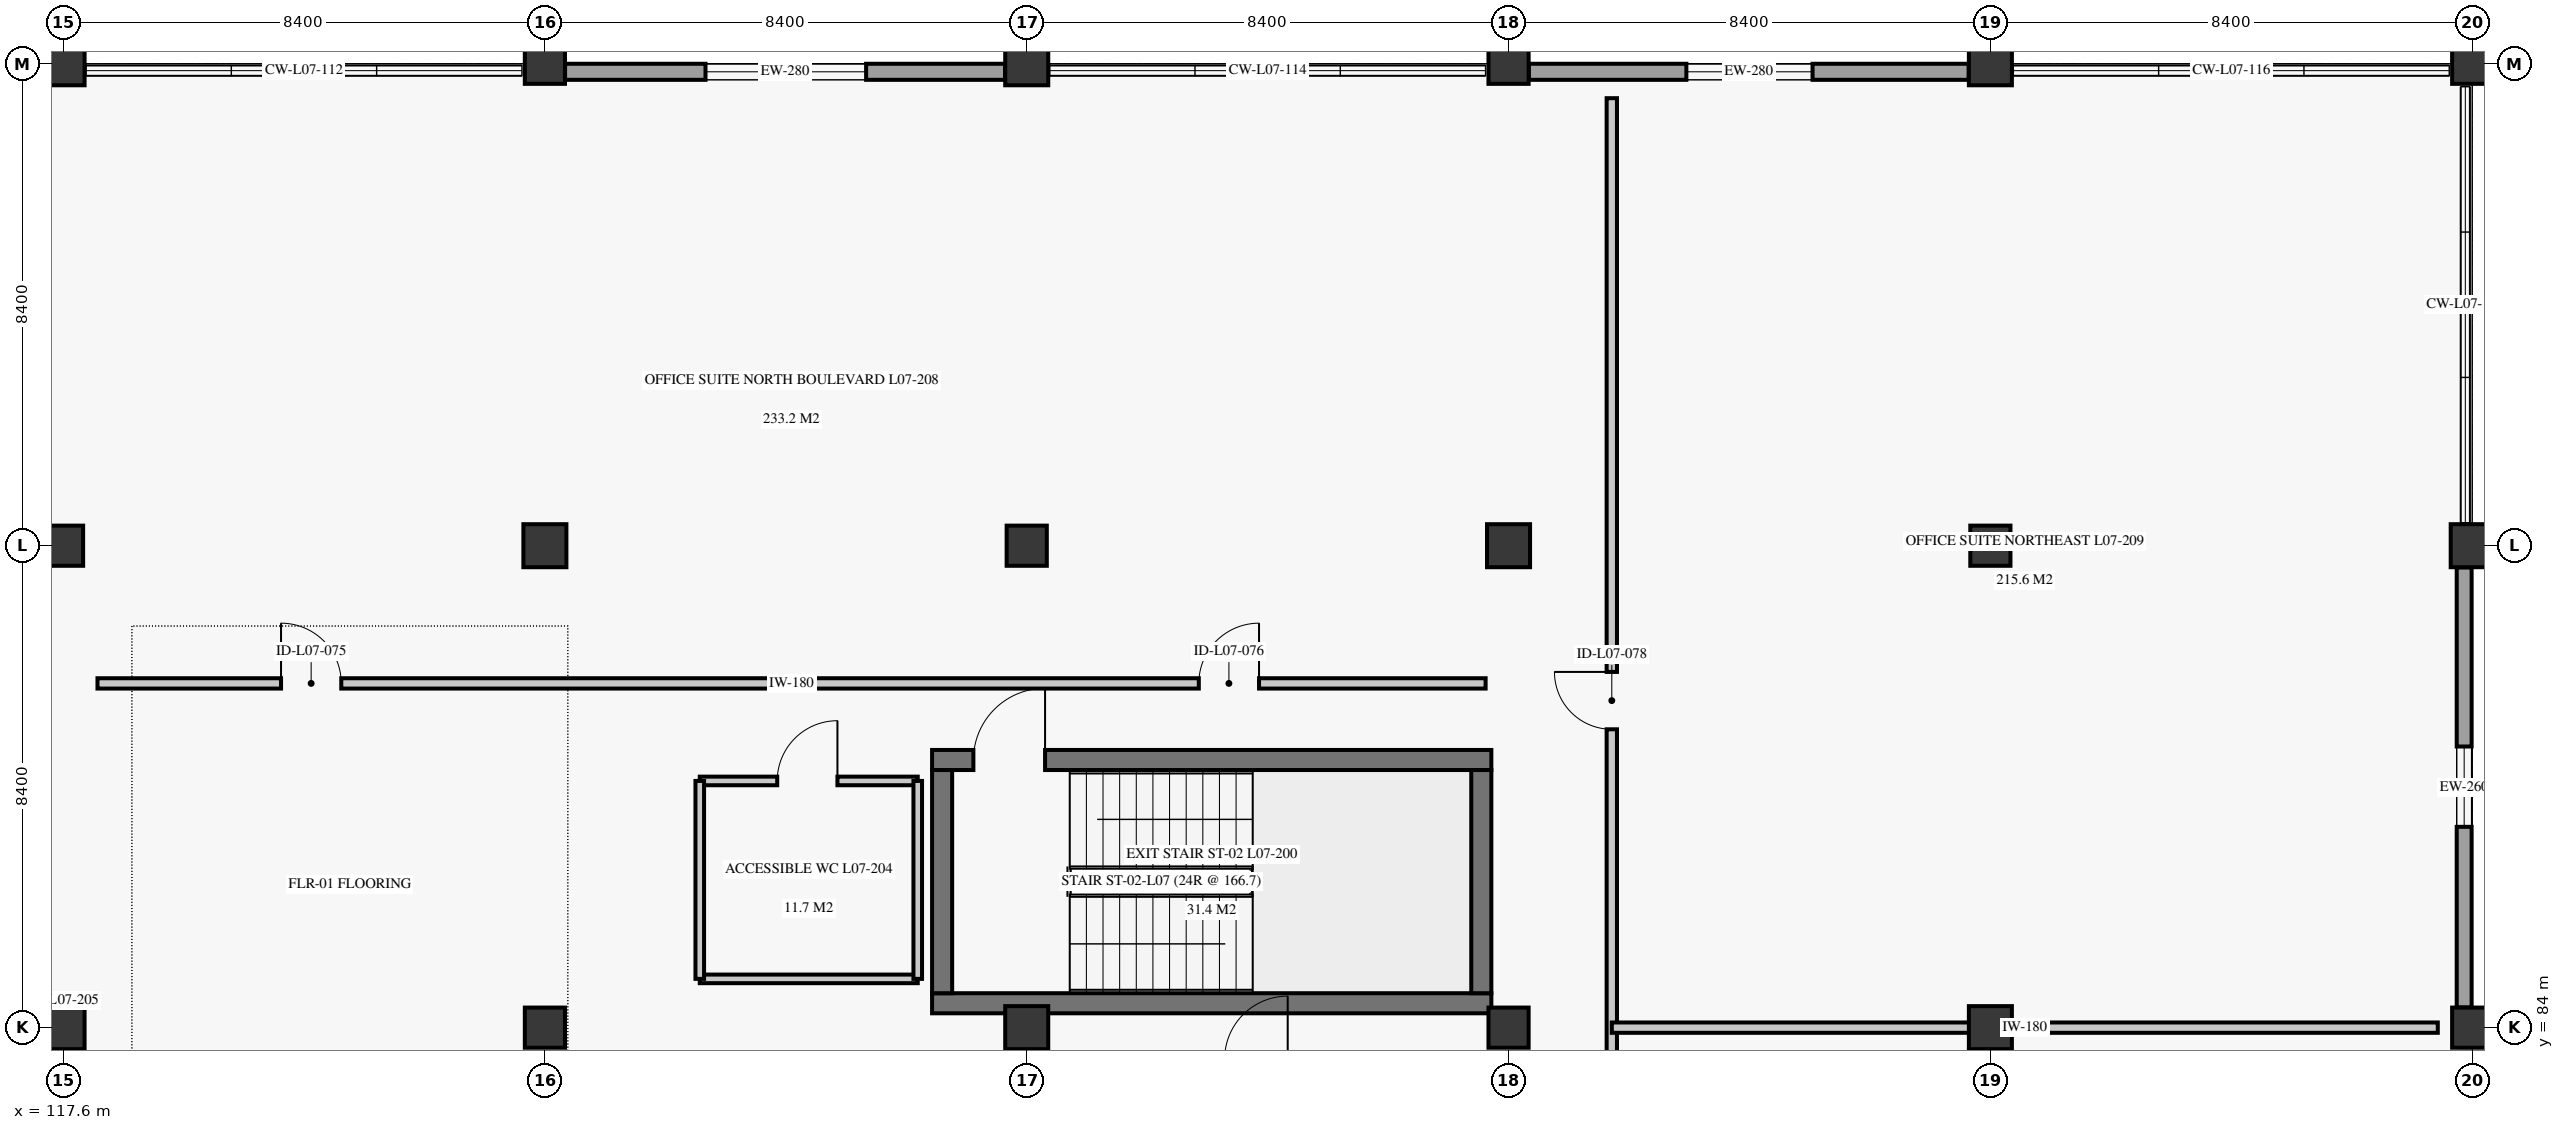
"""IFC4 building model, lengths in metres.
Left out: names, types, materials, properties, quantities, classifications, styles, units other than length and angle.
Written with IfcOpenShell. Run it as: python <this file> out.ifc"""

import sys

from ifc_helpers import new_model, si_unit, direction, frame, frame_2d, origin, origin_2d, place, context, subcontext, project, spatial, rectangle, extrude, element, fill, save


model = new_model("IFC4")
c1 = context("Model", 3, precision=1e-05, world=origin(), true_north=direction((0.0, 1.0)))
c2 = subcontext(c1, "Body", "Model", "MODEL_VIEW")
j1 = project(units=[si_unit("LENGTHUNIT", "METRE"), si_unit("PLANEANGLEUNIT", "RADIAN")], contexts=[c1])
p1 = place(None, origin())
s1 = spatial("IfcSite", under=j1, at=p1, CompositionType="ELEMENT")
p2 = place(p1, origin())
s2 = spatial("IfcBuilding", under=s1, at=p2, CompositionType="ELEMENT")
p3 = place(p2, frame((0.0, 0.0, 30.7)))
s3 = spatial("IfcBuildingStorey", under=s2, at=p3, CompositionType="ELEMENT", Elevation=30.7)
p4 = place(p3, frame((117.6, 84.0, 0.0), z_axis=(0.0, 0.0, 1.0), x_axis=(1.0, 0.0, 0.0)))
e1 = element("IfcColumn", 1, at=p4, inside=s3, PredefinedType="COLUMN", context=c2, shape_type="SweptSolid", body=[
    extrude(rectangle(XDim=0.75, YDim=0.75, at=origin_2d()), origin(), (0.0, 0.0, 1.0), 3.72),
])
p5 = place(p3, frame((117.6, 92.4, 0.0), z_axis=(0.0, 0.0, 1.0), x_axis=(1.0, 0.0, 0.0)))
e2 = element("IfcColumn", 2, at=p5, inside=s3, PredefinedType="COLUMN", context=c2, shape_type="SweptSolid", body=[
    extrude(rectangle(XDim=0.7, YDim=0.7, at=origin_2d()), origin(), (0.0, 0.0, 1.0), 3.72),
])
p6 = place(p3, frame((117.6, 100.8, 0.0), z_axis=(0.0, 0.0, 1.0), x_axis=(1.0, 0.0, 0.0)))
e3 = element("IfcColumn", 3, at=p6, inside=s3, PredefinedType="COLUMN", context=c2, shape_type="SweptSolid", body=[
    extrude(rectangle(XDim=0.75, YDim=0.75, at=origin_2d()), origin(), (0.0, 0.0, 1.0), 3.72),
])
p7 = place(p3, frame((126.0, 84.0, 0.0), z_axis=(0.0, 0.0, 1.0), x_axis=(1.0, 0.0, 0.0)))
e4 = element("IfcColumn", 4, at=p7, inside=s3, PredefinedType="COLUMN", context=c2, shape_type="SweptSolid", body=[
    extrude(rectangle(XDim=0.7, YDim=0.7, at=origin_2d()), origin(), (0.0, 0.0, 1.0), 3.72),
])
p8 = place(p3, frame((126.0, 92.4, 0.0), z_axis=(0.0, 0.0, 1.0), x_axis=(1.0, 0.0, 0.0)))
e5 = element("IfcColumn", 5, at=p8, inside=s3, PredefinedType="COLUMN", context=c2, shape_type="SweptSolid", body=[
    extrude(rectangle(XDim=0.75, YDim=0.75, at=origin_2d()), origin(), (0.0, 0.0, 1.0), 3.72),
])
p9 = place(p3, frame((126.0, 100.8, 0.0), z_axis=(0.0, 0.0, 1.0), x_axis=(1.0, 0.0, 0.0)))
e6 = element("IfcColumn", 6, at=p9, inside=s3, PredefinedType="COLUMN", context=c2, shape_type="SweptSolid", body=[
    extrude(rectangle(XDim=0.7, YDim=0.7, at=origin_2d()), origin(), (0.0, 0.0, 1.0), 3.72),
])
p10 = place(p3, frame((134.4, 84.0, 0.0), z_axis=(0.0, 0.0, 1.0), x_axis=(1.0, 0.0, 0.0)))
e7 = element("IfcColumn", 7, at=p10, inside=s3, PredefinedType="COLUMN", context=c2, shape_type="SweptSolid", body=[
    extrude(rectangle(XDim=0.75, YDim=0.75, at=origin_2d()), origin(), (0.0, 0.0, 1.0), 3.72),
])
p11 = place(p3, frame((134.4, 92.4, 0.0), z_axis=(0.0, 0.0, 1.0), x_axis=(1.0, 0.0, 0.0)))
e8 = element("IfcColumn", 8, at=p11, inside=s3, PredefinedType="COLUMN", context=c2, shape_type="SweptSolid", body=[
    extrude(rectangle(XDim=0.7, YDim=0.7, at=origin_2d()), origin(), (0.0, 0.0, 1.0), 3.72),
])
p12 = place(p3, frame((134.4, 100.8, 0.0), z_axis=(0.0, 0.0, 1.0), x_axis=(1.0, 0.0, 0.0)))
e9 = element("IfcColumn", 9, at=p12, inside=s3, PredefinedType="COLUMN", context=c2, shape_type="SweptSolid", body=[
    extrude(rectangle(XDim=0.75, YDim=0.75, at=origin_2d()), origin(), (0.0, 0.0, 1.0), 3.72),
])
p13 = place(p3, frame((142.8, 84.0, 0.0), z_axis=(0.0, 0.0, 1.0), x_axis=(1.0, 0.0, 0.0)))
e10 = element("IfcColumn", 10, at=p13, inside=s3, PredefinedType="COLUMN", context=c2, shape_type="SweptSolid", body=[
    extrude(rectangle(XDim=0.7, YDim=0.7, at=origin_2d()), origin(), (0.0, 0.0, 1.0), 3.72),
])
p14 = place(p3, frame((142.8, 92.4, 0.0), z_axis=(0.0, 0.0, 1.0), x_axis=(1.0, 0.0, 0.0)))
e11 = element("IfcColumn", 11, at=p14, inside=s3, PredefinedType="COLUMN", context=c2, shape_type="SweptSolid", body=[
    extrude(rectangle(XDim=0.75, YDim=0.75, at=origin_2d()), origin(), (0.0, 0.0, 1.0), 3.72),
])
p15 = place(p3, frame((142.8, 100.8, 0.0), z_axis=(0.0, 0.0, 1.0), x_axis=(1.0, 0.0, 0.0)))
e12 = element("IfcColumn", 12, at=p15, inside=s3, PredefinedType="COLUMN", context=c2, shape_type="SweptSolid", body=[
    extrude(rectangle(XDim=0.7, YDim=0.7, at=origin_2d()), origin(), (0.0, 0.0, 1.0), 3.72),
])
p16 = place(p3, frame((151.2, 84.0, 0.0), z_axis=(0.0, 0.0, 1.0), x_axis=(1.0, 0.0, 0.0)))
e13 = element("IfcColumn", 13, at=p16, inside=s3, PredefinedType="COLUMN", context=c2, shape_type="SweptSolid", body=[
    extrude(rectangle(XDim=0.75, YDim=0.75, at=origin_2d()), origin(), (0.0, 0.0, 1.0), 3.72),
])
p17 = place(p3, frame((151.2, 92.4, 0.0), z_axis=(0.0, 0.0, 1.0), x_axis=(1.0, 0.0, 0.0)))
e14 = element("IfcColumn", 14, at=p17, inside=s3, PredefinedType="COLUMN", context=c2, shape_type="SweptSolid", body=[
    extrude(rectangle(XDim=0.7, YDim=0.7, at=origin_2d()), origin(), (0.0, 0.0, 1.0), 3.72),
])
p18 = place(p3, frame((151.2, 100.8, 0.0), z_axis=(0.0, 0.0, 1.0), x_axis=(1.0, 0.0, 0.0)))
e15 = element("IfcColumn", 15, at=p18, inside=s3, PredefinedType="COLUMN", context=c2, shape_type="SweptSolid", body=[
    extrude(rectangle(XDim=0.75, YDim=0.75, at=origin_2d()), origin(), (0.0, 0.0, 1.0), 3.72),
])
p19 = place(p3, frame((159.6, 84.0, 0.0), z_axis=(0.0, 0.0, 1.0), x_axis=(1.0, 0.0, 0.0)))
e16 = element("IfcColumn", 16, at=p19, inside=s3, PredefinedType="COLUMN", context=c2, shape_type="SweptSolid", body=[
    extrude(rectangle(XDim=0.7, YDim=0.7, at=origin_2d()), origin(), (0.0, 0.0, 1.0), 3.72),
])
p20 = place(p3, frame((159.6, 92.4, 0.0), z_axis=(0.0, 0.0, 1.0), x_axis=(1.0, 0.0, 0.0)))
e17 = element("IfcColumn", 17, at=p20, inside=s3, PredefinedType="COLUMN", context=c2, shape_type="SweptSolid", body=[
    extrude(rectangle(XDim=0.75, YDim=0.75, at=origin_2d()), origin(), (0.0, 0.0, 1.0), 3.72),
])
p21 = place(p3, frame((159.6, 100.8, 0.0), z_axis=(0.0, 0.0, 1.0), x_axis=(1.0, 0.0, 0.0)))
e18 = element("IfcColumn", 18, at=p21, inside=s3, PredefinedType="COLUMN", context=c2, shape_type="SweptSolid", body=[
    extrude(rectangle(XDim=0.7, YDim=0.7, at=origin_2d()), origin(), (0.0, 0.0, 1.0), 3.72),
])
p22 = place(p3, frame((126.352, 100.66, 0.0), z_axis=(0.0, 0.0, 1.0), x_axis=(1.0, 0.0, 0.0)))
e19 = element("IfcWall", 19, at=p22, inside=s3, PredefinedType="SOLIDWALL", context=c2, shape_type="SweptSolid", body=[
    extrude(rectangle(XDim=7.67, YDim=0.28, at=frame_2d((3.835, 0.0))), origin(), (0.0, 0.0, 1.0), 3.04),
])
p23 = place(p22, frame((2.448, 0.0, 0.85)))
e20 = element("IfcOpeningElement", 20, at=p23, cuts=e19, PredefinedType="OPENING", context=c2, shape_type="SweptSolid", body=[
    extrude(rectangle(XDim=2.8, YDim=1.85, at=frame_2d((1.4, 0.925))), frame((0.0, 0.15, 0.0), z_axis=(0.0, -1.0, 0.0), x_axis=(1.0, 0.0, 0.0)), (0.0, 0.0, 1.0), 0.3),
])
p24 = place(p3, frame((143.154, 100.66, 0.0), z_axis=(0.0, 0.0, 1.0), x_axis=(1.0, 0.0, 0.0)))
e21 = element("IfcWall", 21, at=p24, inside=s3, PredefinedType="SOLIDWALL", context=c2, shape_type="SweptSolid", body=[
    extrude(rectangle(XDim=7.668, YDim=0.28, at=frame_2d((3.834, 0.0))), origin(), (0.0, 0.0, 1.0), 3.04),
])
p25 = place(p24, frame((2.746, 0.0, 0.85)))
e22 = element("IfcOpeningElement", 22, at=p25, cuts=e21, PredefinedType="OPENING", context=c2, shape_type="SweptSolid", body=[
    extrude(rectangle(XDim=2.2, YDim=1.8, at=frame_2d((1.1, 0.9))), frame((0.0, 0.15, 0.0), z_axis=(0.0, -1.0, 0.0), x_axis=(1.0, 0.0, 0.0)), (0.0, 0.0, 1.0), 0.3),
])
p26 = place(p3, frame((159.46, 84.352, 0.0), z_axis=(0.0, 0.0, 1.0), x_axis=(0.0, 1.0, 0.0)))
e23 = element("IfcWall", 23, at=p26, inside=s3, PredefinedType="SOLIDWALL", context=c2, shape_type="SweptSolid", body=[
    extrude(rectangle(XDim=7.67, YDim=0.26, at=frame_2d((3.835, 0.0))), origin(), (0.0, 0.0, 1.0), 3.04),
])
p27 = place(p26, frame((3.148, 0.0, 0.85)))
e24 = element("IfcOpeningElement", 24, at=p27, cuts=e23, PredefinedType="OPENING", context=c2, shape_type="SweptSolid", body=[
    extrude(rectangle(XDim=1.4, YDim=1.7, at=frame_2d((0.7, 0.85))), frame((0.0, 0.14, 0.0), z_axis=(0.0, -1.0, 0.0), x_axis=(1.0, 0.0, 0.0)), (0.0, 0.0, 1.0), 0.28),
])
p28 = place(p3, frame((132.75, 84.425, 0.0), z_axis=(0.0, 0.0, 1.0), x_axis=(1.0, 0.0, 0.0)))
e25 = element("IfcWall", 25, at=p28, inside=s3, PredefinedType="SHEAR", context=c2, shape_type="SweptSolid", body=[
    extrude(rectangle(XDim=9.75, YDim=0.35, at=frame_2d((4.875, 0.0))), origin(), (0.0, 0.0, 1.0), 3.72),
])
p29 = place(p3, frame((132.75, 88.665, 0.0), z_axis=(0.0, 0.0, 1.0), x_axis=(1.0, 0.0, 0.0)))
e26 = element("IfcWall", 26, at=p29, inside=s3, PredefinedType="SHEAR", context=c2, shape_type="SweptSolid", body=[
    extrude(rectangle(XDim=9.75, YDim=0.35, at=frame_2d((4.875, 0.0))), origin(), (0.0, 0.0, 1.0), 3.72),
])
p30 = place(p29, frame((0.72, 0.0, 0.0)))
e27 = element("IfcOpeningElement", 27, at=p30, cuts=e26, PredefinedType="OPENING", context=c2, shape_type="SweptSolid", body=[
    extrude(rectangle(XDim=1.25, YDim=2.2, at=frame_2d((0.625, 1.1))), frame((0.0, 0.185, 0.0), z_axis=(0.0, -1.0, 0.0), x_axis=(1.0, 0.0, 0.0)), (0.0, 0.0, 1.0), 0.37),
])
for number, where, z_axis, x_axis in (
    (28, (132.925, 84.6, 0.0), (0.0, 0.0, 1.0), (0.0, 1.0, 0.0)),
    (29, (142.325, 84.6, 0.0), (0.0, 0.0, 1.0), (0.0, 1.0, 0.0)),
):
    element("IfcWall", number, at=place(p3, frame(where, z_axis=z_axis, x_axis=x_axis)), inside=s3, PredefinedType="SHEAR", context=c2, shape_type="SweptSolid", body=[
        extrude(rectangle(XDim=3.89, YDim=0.35, at=frame_2d((1.945, 0.0))), origin(), (0.0, 0.0, 1.0), 3.72),
    ])
p31 = place(p3, frame((128.7, 88.3, 0.0), z_axis=(0.0, 0.0, 1.0), x_axis=(1.0, 0.0, 0.0)))
e30 = element("IfcWall", 30, at=p31, inside=s3, PredefinedType="PARTITIONING", context=c2, shape_type="SweptSolid", body=[
    extrude(rectangle(XDim=3.8, YDim=0.15, at=frame_2d((1.9, 0.0))), origin(), (0.0, 0.0, 1.0), 3.34),
])
p32 = place(p31, frame((1.35, 0.0, 0.0)))
e31 = element("IfcOpeningElement", 31, at=p32, cuts=e30, PredefinedType="OPENING", context=c2, shape_type="SweptSolid", body=[
    extrude(rectangle(XDim=1.05, YDim=2.15, at=frame_2d((0.525, 1.075))), frame((0.0, 0.085, 0.0), z_axis=(0.0, -1.0, 0.0), x_axis=(1.0, 0.0, 0.0)), (0.0, 0.0, 1.0), 0.17),
])
p33 = place(p3, frame((128.7, 84.85, 0.0), z_axis=(0.0, 0.0, 1.0), x_axis=(1.0, 0.0, 0.0)))
e32 = element("IfcWall", 32, at=p33, inside=s3, PredefinedType="PARTITIONING", context=c2, shape_type="SweptSolid", body=[
    extrude(rectangle(XDim=3.8, YDim=0.15, at=frame_2d((1.9, 0.0))), origin(), (0.0, 0.0, 1.0), 3.34),
])
for number, where, z_axis, x_axis in (
    (33, (128.7, 84.85, 0.0), (0.0, 0.0, 1.0), (0.0, 1.0, 0.0)),
    (34, (132.5, 84.85, 0.0), (0.0, 0.0, 1.0), (0.0, 1.0, 0.0)),
):
    element("IfcWall", number, at=place(p3, frame(where, z_axis=z_axis, x_axis=x_axis)), inside=s3, PredefinedType="PARTITIONING", context=c2, shape_type="SweptSolid", body=[
        extrude(rectangle(XDim=3.45, YDim=0.15, at=frame_2d((1.725, 0.0))), origin(), (0.0, 0.0, 1.0), 3.34),
    ])
p34 = place(p3, frame((118.2, 90.0, 0.0), z_axis=(0.0, 0.0, 1.0), x_axis=(1.0, 0.0, 0.0)))
e35 = element("IfcWall", 35, at=p34, inside=s3, PredefinedType="PARTITIONING", context=c2, shape_type="SweptSolid", body=[
    extrude(rectangle(XDim=24.2, YDim=0.18, at=frame_2d((12.1, 0.0))), origin(), (0.0, 0.0, 1.0), 3.34),
])
p35 = place(p34, frame((3.2, 0.0, 0.0)))
e36 = element("IfcOpeningElement", 36, at=p35, cuts=e35, PredefinedType="OPENING", context=c2, shape_type="SweptSolid", body=[
    extrude(rectangle(XDim=1.05, YDim=2.2, at=frame_2d((0.525, 1.1))), frame((0.0, 0.1, 0.0), z_axis=(0.0, -1.0, 0.0), x_axis=(1.0, 0.0, 0.0)), (0.0, 0.0, 1.0), 0.2),
])
p36 = place(p34, frame((19.2, 0.0, 0.0)))
e37 = element("IfcOpeningElement", 37, at=p36, cuts=e35, PredefinedType="OPENING", context=c2, shape_type="SweptSolid", body=[
    extrude(rectangle(XDim=1.05, YDim=2.2, at=frame_2d((0.525, 1.1))), frame((0.0, 0.1, 0.0), z_axis=(0.0, -1.0, 0.0), x_axis=(1.0, 0.0, 0.0)), (0.0, 0.0, 1.0), 0.2),
])
p37 = place(p3, frame((144.6, 67.8, 0.0), z_axis=(0.0, 0.0, 1.0), x_axis=(0.0, 1.0, 0.0)))
e38 = element("IfcWall", 38, at=p37, inside=s3, PredefinedType="PARTITIONING", context=c2, shape_type="SweptSolid", body=[
    extrude(rectangle(XDim=32.4, YDim=0.18, at=frame_2d((16.2, 0.0))), origin(), (0.0, 0.0, 1.0), 3.34),
])
p38 = place(p37, frame((4.2, 0.0, 0.0)))
e39 = element("IfcOpeningElement", 39, at=p38, cuts=e38, PredefinedType="OPENING", context=c2, shape_type="SweptSolid", body=[
    extrude(rectangle(XDim=1.0, YDim=2.15, at=frame_2d((0.5, 1.075))), frame((0.0, 0.1, 0.0), z_axis=(0.0, -1.0, 0.0), x_axis=(1.0, 0.0, 0.0)), (0.0, 0.0, 1.0), 0.2),
])
p39 = place(p37, frame((21.4, 0.0, 0.0)))
e40 = element("IfcOpeningElement", 40, at=p39, cuts=e38, PredefinedType="OPENING", context=c2, shape_type="SweptSolid", body=[
    extrude(rectangle(XDim=1.0, YDim=2.15, at=frame_2d((0.5, 1.075))), frame((0.0, 0.1, 0.0), z_axis=(0.0, -1.0, 0.0), x_axis=(1.0, 0.0, 0.0)), (0.0, 0.0, 1.0), 0.2),
])
p40 = place(p3, frame((144.6, 84.0, 0.0), z_axis=(0.0, 0.0, 1.0), x_axis=(1.0, 0.0, 0.0)))
e41 = element("IfcWall", 41, at=p40, inside=s3, PredefinedType="PARTITIONING", context=c2, shape_type="SweptSolid", body=[
    extrude(rectangle(XDim=14.4, YDim=0.18, at=frame_2d((7.2, 0.0))), origin(), (0.0, 0.0, 1.0), 3.34),
])
p41 = place(p23, origin())
e42 = element("IfcWindow", 42, at=p41, inside=s3, PartitioningType="SINGLE_PANEL", PredefinedType="WINDOW", context=c2, shape_type="SweptSolid", body=[
    extrude(rectangle(XDim=2.8, YDim=1.85, at=frame_2d((1.4, 0.925))), frame((0.0, 0.03, 0.0), z_axis=(0.0, -1.0, 0.0), x_axis=(1.0, 0.0, 0.0)), (0.0, 0.0, 1.0), 0.06),
])
fill(e20, e42)
p42 = place(p25, origin())
e43 = element("IfcWindow", 43, at=p42, inside=s3, PartitioningType="SINGLE_PANEL", PredefinedType="WINDOW", context=c2, shape_type="SweptSolid", body=[
    extrude(rectangle(XDim=2.2, YDim=1.8, at=frame_2d((1.1, 0.9))), frame((0.0, 0.03, 0.0), z_axis=(0.0, -1.0, 0.0), x_axis=(1.0, 0.0, 0.0)), (0.0, 0.0, 1.0), 0.06),
])
fill(e22, e43)
p43 = place(p27, origin())
e44 = element("IfcWindow", 44, at=p43, inside=s3, PartitioningType="SINGLE_PANEL", PredefinedType="WINDOW", context=c2, shape_type="SweptSolid", body=[
    extrude(rectangle(XDim=1.4, YDim=1.7, at=frame_2d((0.7, 0.85))), frame((0.0, 0.03, 0.0), z_axis=(0.0, -1.0, 0.0), x_axis=(1.0, 0.0, 0.0)), (0.0, 0.0, 1.0), 0.06),
])
fill(e24, e44)
p44 = place(p30, origin())
e45 = element("IfcDoor", 45, at=p44, inside=s3, OperationType="SINGLE_SWING_RIGHT", PredefinedType="DOOR", context=c2, shape_type="SweptSolid", body=[
    extrude(rectangle(XDim=1.25, YDim=2.2, at=frame_2d((0.625, 1.1))), frame((0.0, 0.025, 0.0), z_axis=(0.0, -1.0, 0.0), x_axis=(1.0, 0.0, 0.0)), (0.0, 0.0, 1.0), 0.05),
])
fill(e27, e45)
p45 = place(p32, origin())
e46 = element("IfcDoor", 46, at=p45, inside=s3, OperationType="SINGLE_SWING_RIGHT", PredefinedType="DOOR", context=c2, shape_type="SweptSolid", body=[
    extrude(rectangle(XDim=1.05, YDim=2.15, at=frame_2d((0.525, 1.075))), frame((0.0, 0.025, 0.0), z_axis=(0.0, -1.0, 0.0), x_axis=(1.0, 0.0, 0.0)), (0.0, 0.0, 1.0), 0.05),
])
fill(e31, e46)
p46 = place(p35, origin())
e47 = element("IfcDoor", 47, at=p46, inside=s3, OperationType="SINGLE_SWING_LEFT", PredefinedType="DOOR", context=c2, shape_type="SweptSolid", body=[
    extrude(rectangle(XDim=1.05, YDim=2.2, at=frame_2d((0.525, 1.1))), frame((0.0, 0.025, 0.0), z_axis=(0.0, -1.0, 0.0), x_axis=(1.0, 0.0, 0.0)), (0.0, 0.0, 1.0), 0.05),
])
fill(e36, e47)
p47 = place(p36, origin())
e48 = element("IfcDoor", 48, at=p47, inside=s3, OperationType="SINGLE_SWING_RIGHT", PredefinedType="DOOR", context=c2, shape_type="SweptSolid", body=[
    extrude(rectangle(XDim=1.05, YDim=2.2, at=frame_2d((0.525, 1.1))), frame((0.0, 0.025, 0.0), z_axis=(0.0, -1.0, 0.0), x_axis=(1.0, 0.0, 0.0)), (0.0, 0.0, 1.0), 0.05),
])
fill(e37, e48)
p48 = place(p39, origin())
e49 = element("IfcDoor", 49, at=p48, inside=s3, OperationType="SINGLE_SWING_RIGHT", PredefinedType="DOOR", context=c2, shape_type="SweptSolid", body=[
    extrude(rectangle(XDim=1.0, YDim=2.15, at=frame_2d((0.5, 1.075))), frame((0.0, 0.025, 0.0), z_axis=(0.0, -1.0, 0.0), x_axis=(1.0, 0.0, 0.0)), (0.0, 0.0, 1.0), 0.05),
])
fill(e40, e49)
save(model, sys.argv[1])
